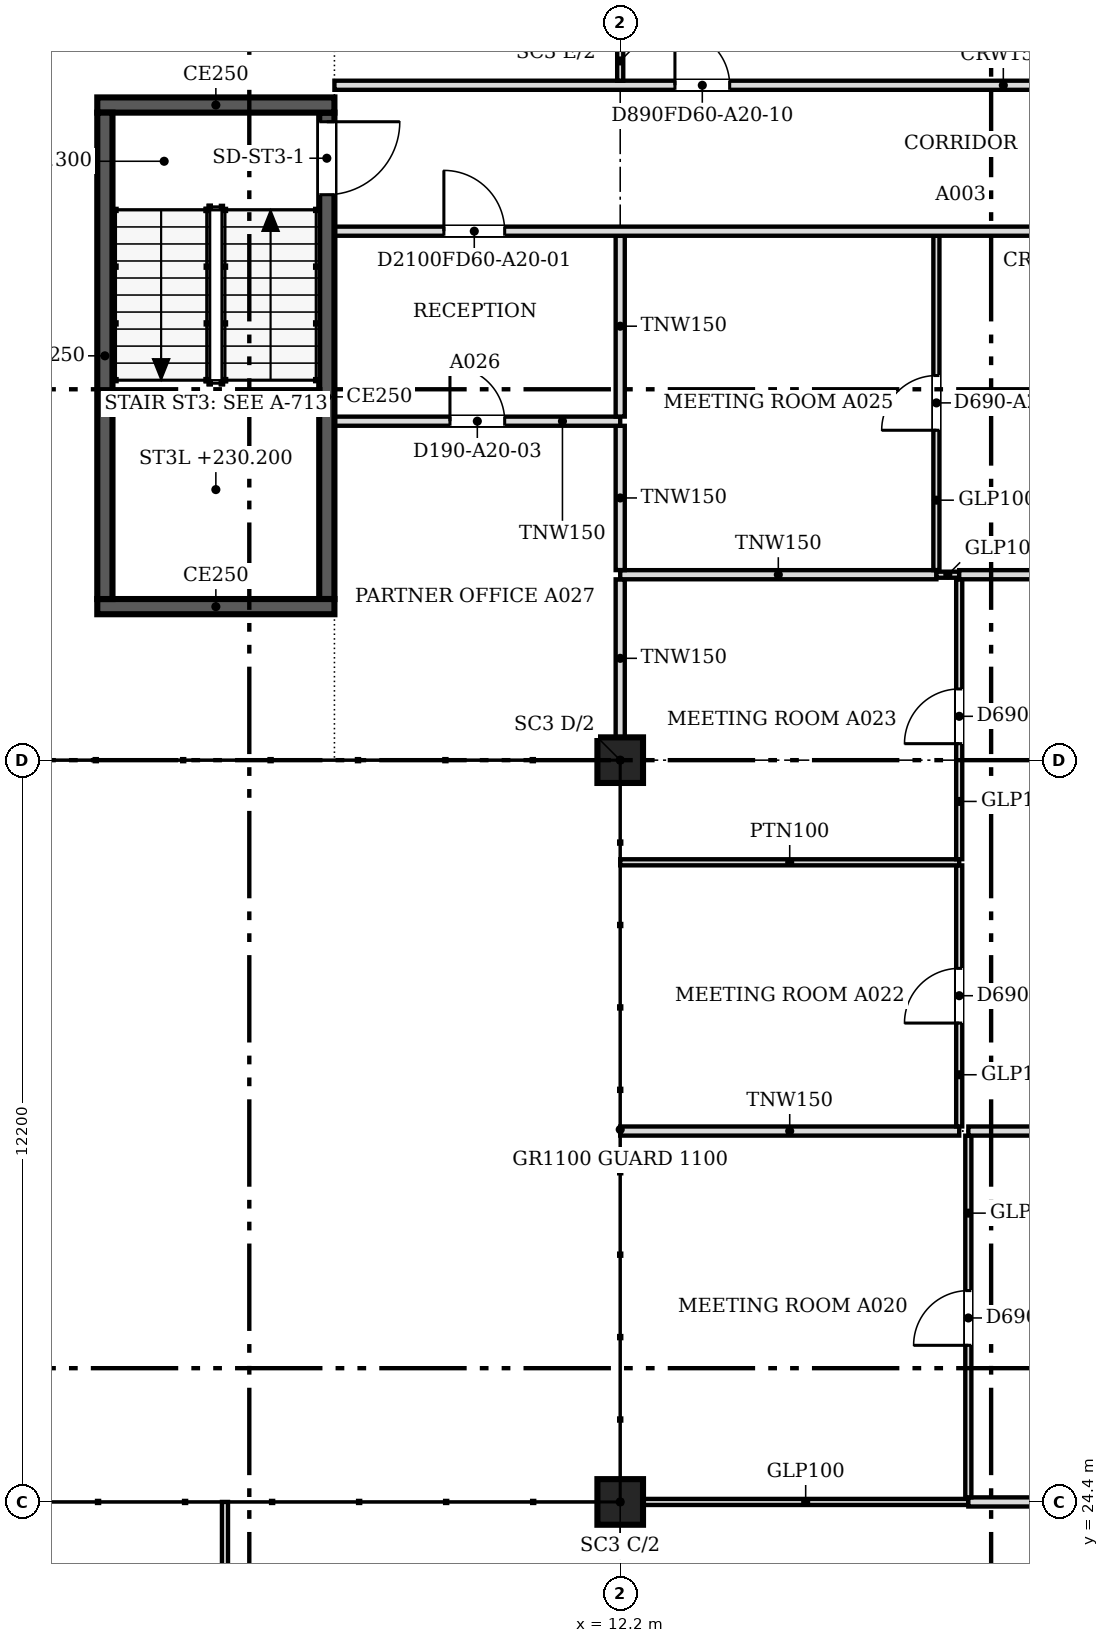
"""IFC4 building model, lengths in metres.
Left out: names, types, materials, properties, quantities, classifications, styles, units other than length and angle.
Written with IfcOpenShell. Run it as: python <this file> out.ifc"""

import sys

from ifc_helpers import new_model, si_unit, direction, frame, frame_2d, origin, origin_2d, place, context, subcontext, project, spatial, rectangle, extrude, source, transform, mapped, element, fill, save


model = new_model("IFC4")
c1 = context("Model", 3, precision=1e-05, world=origin(), true_north=direction((0.0, 1.0)))
c2 = subcontext(c1, "Body", "Model", "MODEL_VIEW")
j1 = project(units=[si_unit("LENGTHUNIT", "METRE"), si_unit("PLANEANGLEUNIT", "RADIAN")], contexts=[c1])
p1 = place(None, origin())
s1 = spatial("IfcSite", under=j1, at=p1, CompositionType="ELEMENT")
p2 = place(p1, origin())
s2 = spatial("IfcBuilding", under=s1, at=p2, CompositionType="ELEMENT")
p3 = place(p2, frame((0.0, 0.0, 228.3)))
s3 = spatial("IfcBuildingStorey", under=s2, at=p3, CompositionType="ELEMENT", Elevation=228.3)
for number, where, z_axis, x_axis in (
    (1, (12.2, 24.4, 0.0), (0.0, 0.0, 1.0), (1.0, 0.0, 0.0)),
    (2, (12.2, 36.6, 0.0), (0.0, 0.0, 1.0), (1.0, 0.0, 0.0)),
):
    element("IfcColumn", number, at=place(p3, frame(where, z_axis=z_axis, x_axis=x_axis)), inside=s3, PredefinedType="COLUMN", context=c2, shape_type="SweptSolid", body=[
        extrude(rectangle(XDim=0.75, YDim=0.75, at=origin_2d()), origin(), (0.0, 0.0, 1.0), 3.5),
    ])
p4 = place(p3, frame((7.5, 39.125, 0.0), z_axis=(0.0, 0.0, 1.0), x_axis=(-1.0, 0.0, 0.0)))
e3 = element("IfcWall", 3, at=p4, inside=s3, PredefinedType="SOLIDWALL", context=c2, shape_type="SweptSolid", body=[
    extrude(rectangle(XDim=3.9, YDim=0.25, at=frame_2d((1.95, 0.0))), origin(), (0.0, 0.0, 1.0), 3.8),
])
p5 = place(p3, frame((3.725, 39.25, 0.0), z_axis=(0.0, 0.0, 1.0), x_axis=(0.0, 1.0, 0.0)))
e4 = element("IfcWall", 4, at=p5, inside=s3, PredefinedType="SOLIDWALL", context=c2, shape_type="SweptSolid", body=[
    extrude(rectangle(XDim=8.0, YDim=0.25, at=frame_2d((4.0, 0.0))), origin(), (0.0, 0.0, 1.0), 3.8),
])
p6 = place(p3, frame((3.6, 47.375, 0.0), z_axis=(0.0, 0.0, 1.0), x_axis=(1.0, 0.0, 0.0)))
e5 = element("IfcWall", 5, at=p6, inside=s3, PredefinedType="SOLIDWALL", context=c2, shape_type="SweptSolid", body=[
    extrude(rectangle(XDim=3.9, YDim=0.25, at=frame_2d((1.95, 0.0))), origin(), (0.0, 0.0, 1.0), 3.8),
])
p7 = place(p3, frame((7.375, 47.25, 0.0), z_axis=(0.0, 0.0, 1.0), x_axis=(0.0, -1.0, 0.0)))
e6 = element("IfcWall", 6, at=p7, inside=s3, PredefinedType="SOLIDWALL", context=c2, shape_type="SweptSolid", body=[
    extrude(rectangle(XDim=8.0, YDim=0.25, at=frame_2d((4.0, 0.0))), origin(), (0.0, 0.0, 1.0), 3.8),
])
m1 = source(origin(), c2, "Body", "SweptSolid", [
    extrude(rectangle(XDim=1.2, YDim=2.1, at=frame_2d((0.6, 1.05))), frame((0.0, 0.135, 0.0), z_axis=(0.0, -1.0, 0.0), x_axis=(1.0, 0.0, 0.0)), (0.0, 0.0, 1.0), 0.27),
])
p8 = place(p7, frame((0.15, 0.0, 0.0)))
e7 = element("IfcOpeningElement", 7, at=p8, cuts=e6, PredefinedType="OPENING", context=c2, shape_type="MappedRepresentation", body=[
    mapped(m1, transform((0.0, 0.0, 0.0), scale=1.0)),
])
p9 = place(p3, frame((5.7, 18.99, 0.0), z_axis=(0.0, 0.0, 1.0), x_axis=(0.0, 1.0, 0.0)))
e8 = element("IfcWall", 8, at=p9, inside=s3, PredefinedType="PARTITIONING", context=c2, shape_type="SweptSolid", body=[
    extrude(rectangle(XDim=5.41, YDim=0.1, at=frame_2d((2.705, 0.0))), origin(), (0.0, 0.0, 1.0), 2.888),
])
m2 = source(origin(), c2, "Body", "SweptSolid", [
    extrude(rectangle(XDim=0.9, YDim=2.1, at=frame_2d((0.45, 1.05))), frame((0.0, 0.06, 0.0), z_axis=(0.0, -1.0, 0.0), x_axis=(1.0, 0.0, 0.0)), (0.0, 0.0, 1.0), 0.12),
])
p10 = place(p9, frame((2.3, 0.0, 0.0)))
e9 = element("IfcOpeningElement", 9, at=p10, cuts=e8, PredefinedType="OPENING", context=c2, shape_type="MappedRepresentation", body=[
    mapped(m2, transform((0.0, 0.0, 0.0), scale=1.0)),
])
p11 = place(p3, frame((12.576, 24.4, 0.0), z_axis=(0.0, 0.0, 1.0), x_axis=(1.0, 0.0, 0.0)))
e10 = element("IfcWall", 10, at=p11, inside=s3, PredefinedType="PARTITIONING", context=c2, shape_type="SweptSolid", body=[
    extrude(rectangle(XDim=5.348, YDim=0.1, at=frame_2d((2.674, 0.0))), origin(), (0.0, 0.0, 1.0), 2.888),
])
p12 = place(p3, frame((17.925, 24.4, 0.0), z_axis=(0.0, 0.0, 1.0), x_axis=(1.0, 0.0, 0.0)))
e11 = element("IfcWall", 11, at=p12, inside=s3, PredefinedType="PARTITIONING", context=c2, shape_type="SweptSolid", body=[
    extrude(rectangle(XDim=6.099, YDim=0.15, at=frame_2d((3.049, 0.0))), origin(), (0.0, 0.0, 1.0), 2.888),
])
p13 = place(p3, frame((17.925, 24.476, 0.0), z_axis=(0.0, 0.0, 1.0), x_axis=(0.0, 1.0, 0.0)))
e12 = element("IfcWall", 12, at=p13, inside=s3, PredefinedType="PARTITIONING", context=c2, shape_type="SweptSolid", body=[
    extrude(rectangle(XDim=5.948, YDim=0.1, at=frame_2d((2.974, 0.0))), origin(), (0.0, 0.0, 1.0), 2.888),
])
p14 = place(p13, frame((2.5, 0.0, 0.0)))
e13 = element("IfcOpeningElement", 13, at=p14, cuts=e12, PredefinedType="OPENING", context=c2, shape_type="MappedRepresentation", body=[
    mapped(m2, transform((0.0, 0.0, 0.0), scale=1.0)),
])
p15 = place(p3, frame((12.2, 30.5, 0.0), z_axis=(0.0, 0.0, 1.0), x_axis=(1.0, 0.0, 0.0)))
e14 = element("IfcWall", 14, at=p15, inside=s3, PredefinedType="PARTITIONING", context=c2, shape_type="SweptSolid", body=[
    extrude(rectangle(XDim=5.575, YDim=0.15, at=frame_2d((2.788, 0.0))), origin(), (0.0, 0.0, 1.0), 2.888),
])
p16 = place(p3, frame((17.925, 30.5, 0.0), z_axis=(0.0, 0.0, 1.0), x_axis=(1.0, 0.0, 0.0)))
e15 = element("IfcWall", 15, at=p16, inside=s3, PredefinedType="PARTITIONING", context=c2, shape_type="SweptSolid", body=[
    extrude(rectangle(XDim=10.099, YDim=0.15, at=frame_2d((5.049, 0.0))), origin(), (0.0, 0.0, 1.0), 2.888),
])
p17 = place(p3, frame((17.775, 30.576, 0.0), z_axis=(0.0, 0.0, 1.0), x_axis=(0.0, 1.0, 0.0)))
e16 = element("IfcWall", 16, at=p17, inside=s3, PredefinedType="PARTITIONING", context=c2, shape_type="SweptSolid", body=[
    extrude(rectangle(XDim=4.293, YDim=0.1, at=frame_2d((2.147, 0.0))), origin(), (0.0, 0.0, 1.0), 2.888),
])
p18 = place(p17, frame((1.7, 0.0, 0.0)))
e17 = element("IfcOpeningElement", 17, at=p18, cuts=e16, PredefinedType="OPENING", context=c2, shape_type="MappedRepresentation", body=[
    mapped(m2, transform((0.0, 0.0, 0.0), scale=1.0)),
])
p19 = place(p3, frame((12.2, 34.92, 0.0), z_axis=(0.0, 0.0, 1.0), x_axis=(1.0, 0.0, 0.0)))
e18 = element("IfcWall", 18, at=p19, inside=s3, PredefinedType="PARTITIONING", context=c2, shape_type="SweptSolid", body=[
    extrude(rectangle(XDim=5.575, YDim=0.1, at=frame_2d((2.788, 0.0))), origin(), (0.0, 0.0, 1.0), 2.888),
])
p20 = place(p3, frame((17.775, 34.971, 0.0), z_axis=(0.0, 0.0, 1.0), x_axis=(0.0, 1.0, 0.0)))
e19 = element("IfcWall", 19, at=p20, inside=s3, PredefinedType="PARTITIONING", context=c2, shape_type="SweptSolid", body=[
    extrude(rectangle(XDim=4.603, YDim=0.1, at=frame_2d((2.301, 0.0))), origin(), (0.0, 0.0, 1.0), 2.888),
])
p21 = place(p20, frame((1.9, 0.0, 0.0)))
e20 = element("IfcOpeningElement", 20, at=p21, cuts=e19, PredefinedType="OPENING", context=c2, shape_type="MappedRepresentation", body=[
    mapped(m2, transform((0.0, 0.0, 0.0), scale=1.0)),
])
p22 = place(p3, frame((12.2, 36.976, 0.0), z_axis=(0.0, 0.0, 1.0), x_axis=(0.0, 1.0, 0.0)))
e21 = element("IfcWall", 21, at=p22, inside=s3, PredefinedType="PARTITIONING", context=c2, shape_type="SweptSolid", body=[
    extrude(rectangle(XDim=2.598, YDim=0.15, at=frame_2d((1.299, 0.0))), origin(), (0.0, 0.0, 1.0), 2.888),
])
p23 = place(p3, frame((12.2, 39.65, 0.0), z_axis=(0.0, 0.0, 1.0), x_axis=(1.0, 0.0, 0.0)))
e22 = element("IfcWall", 22, at=p23, inside=s3, PredefinedType="PARTITIONING", context=c2, shape_type="SweptSolid", body=[
    extrude(rectangle(XDim=5.2, YDim=0.15, at=frame_2d((2.6, 0.0))), origin(), (0.0, 0.0, 1.0), 2.888),
])
p24 = place(p3, frame((17.401, 39.65, 0.0), z_axis=(0.0, 0.0, 1.0), x_axis=(1.0, 0.0, 0.0)))
e23 = element("IfcWall", 23, at=p24, inside=s3, PredefinedType="PARTITIONING", context=c2, shape_type="SweptSolid", body=[
    extrude(rectangle(XDim=0.373, YDim=0.1, at=frame_2d((0.187, 0.0))), origin(), (0.0, 0.0, 1.0), 2.888),
])
p25 = place(p3, frame((17.775, 39.65, 0.0), z_axis=(0.0, 0.0, 1.0), x_axis=(1.0, 0.0, 0.0)))
e24 = element("IfcWall", 24, at=p25, inside=s3, PredefinedType="PARTITIONING", context=c2, shape_type="SweptSolid", body=[
    extrude(rectangle(XDim=10.249, YDim=0.15, at=frame_2d((5.125, 0.0))), origin(), (0.0, 0.0, 1.0), 2.888),
])
p26 = place(p3, frame((12.2, 39.726, 0.0), z_axis=(0.0, 0.0, 1.0), x_axis=(0.0, 1.0, 0.0)))
e25 = element("IfcWall", 25, at=p26, inside=s3, PredefinedType="PARTITIONING", context=c2, shape_type="SweptSolid", body=[
    extrude(rectangle(XDim=2.373, YDim=0.15, at=frame_2d((1.187, 0.0))), origin(), (0.0, 0.0, 1.0), 2.888),
])
p27 = place(p3, frame((17.4, 39.726, 0.0), z_axis=(0.0, 0.0, 1.0), x_axis=(0.0, 1.0, 0.0)))
e26 = element("IfcWall", 26, at=p27, inside=s3, PredefinedType="PARTITIONING", context=c2, shape_type="SweptSolid", body=[
    extrude(rectangle(XDim=5.498, YDim=0.1, at=frame_2d((2.749, 0.0))), origin(), (0.0, 0.0, 1.0), 2.888),
])
p28 = place(p27, frame((2.3, 0.0, 0.0)))
e27 = element("IfcOpeningElement", 27, at=p28, cuts=e26, PredefinedType="OPENING", context=c2, shape_type="MappedRepresentation", body=[
    mapped(m2, transform((0.0, 0.0, 0.0), scale=1.0)),
])
p29 = place(p3, frame((12.2, 42.175, 0.0), z_axis=(0.0, 0.0, 1.0), x_axis=(-1.0, 0.0, 0.0)))
e28 = element("IfcWall", 28, at=p29, inside=s3, PredefinedType="PARTITIONING", context=c2, shape_type="SweptSolid", body=[
    extrude(rectangle(XDim=4.7, YDim=0.15, at=frame_2d((2.35, 0.0))), origin(), (0.0, 0.0, 1.0), 2.888),
])
m3 = source(origin(), c2, "Body", "SweptSolid", [
    extrude(rectangle(XDim=0.9, YDim=2.1, at=frame_2d((0.45, 1.05))), frame((0.0, 0.085, 0.0), z_axis=(0.0, -1.0, 0.0), x_axis=(1.0, 0.0, 0.0)), (0.0, 0.0, 1.0), 0.17),
])
p30 = place(p29, frame((1.9, 0.0, 0.0)))
e29 = element("IfcOpeningElement", 29, at=p30, cuts=e28, PredefinedType="OPENING", context=c2, shape_type="MappedRepresentation", body=[
    mapped(m3, transform((0.0, 0.0, 0.0), scale=1.0)),
])
p31 = place(p3, frame((12.2, 42.251, 0.0), z_axis=(0.0, 0.0, 1.0), x_axis=(0.0, 1.0, 0.0)))
e30 = element("IfcWall", 30, at=p31, inside=s3, PredefinedType="PARTITIONING", context=c2, shape_type="SweptSolid", body=[
    extrude(rectangle(XDim=2.973, YDim=0.15, at=frame_2d((1.487, 0.0))), origin(), (0.0, 0.0, 1.0), 2.888),
])
p32 = place(p3, frame((28.1, 45.3, 0.0), z_axis=(0.0, 0.0, 1.0), x_axis=(-1.0, 0.0, 0.0)))
e31 = element("IfcWall", 31, at=p32, inside=s3, PredefinedType="PARTITIONING", context=c2, shape_type="SweptSolid", body=[
    extrude(rectangle(XDim=20.6, YDim=0.15, at=frame_2d((10.3, 0.0))), origin(), (0.0, 0.0, 1.0), 2.888),
])
m4 = source(origin(), c2, "Body", "SweptSolid", [
    extrude(rectangle(XDim=1.0, YDim=2.1, at=frame_2d((0.5, 1.05))), frame((0.0, 0.085, 0.0), z_axis=(0.0, -1.0, 0.0), x_axis=(1.0, 0.0, 0.0)), (0.0, 0.0, 1.0), 0.17),
])
p33 = place(p32, frame((17.8, 0.0, 0.0)))
e32 = element("IfcOpeningElement", 32, at=p33, cuts=e31, PredefinedType="OPENING", context=c2, shape_type="MappedRepresentation", body=[
    mapped(m4, transform((0.0, 0.0, 0.0), scale=1.0)),
])
p34 = place(p3, frame((7.5, 47.7, 0.0), z_axis=(0.0, 0.0, 1.0), x_axis=(1.0, 0.0, 0.0)))
e33 = element("IfcWall", 33, at=p34, inside=s3, PredefinedType="PARTITIONING", context=c2, shape_type="SweptSolid", body=[
    extrude(rectangle(XDim=20.6, YDim=0.15, at=frame_2d((10.3, 0.0))), origin(), (0.0, 0.0, 1.0), 2.888),
])
p35 = place(p34, frame((15.501, 0.0, 0.0)))
e34 = element("IfcOpeningElement", 34, at=p35, cuts=e33, PredefinedType="OPENING", context=c2, shape_type="MappedRepresentation", body=[
    mapped(m4, transform((0.0, 0.0, 0.0), scale=1.0)),
])
p36 = place(p34, frame((5.6, 0.0, 0.0)))
e35 = element("IfcOpeningElement", 35, at=p36, cuts=e33, PredefinedType="OPENING", context=c2, shape_type="MappedRepresentation", body=[
    mapped(m3, transform((0.0, 0.0, 0.0), scale=1.0)),
])
p37 = place(p3, frame((12.2, 48.425, 0.0), z_axis=(0.0, 0.0, 1.0), x_axis=(0.0, -1.0, 0.0)))
e36 = element("IfcWall", 36, at=p37, inside=s3, PredefinedType="PARTITIONING", context=c2, shape_type="SweptSolid", body=[
    extrude(rectangle(XDim=0.65, YDim=0.1, at=frame_2d((0.325, 0.0))), origin(), (0.0, 0.0, 1.0), 2.888),
])
m5 = source(origin(), c2, "Body", "SweptSolid", [
    extrude(rectangle(XDim=1.2, YDim=2.1, at=frame_2d((0.6, 1.05))), frame((0.0, 0.025, 0.0), z_axis=(0.0, -1.0, 0.0), x_axis=(1.0, 0.0, 0.0)), (0.0, 0.0, 1.0), 0.05),
])
p38 = place(p8, origin())
e37 = element("IfcDoor", 37, at=p38, inside=s3, OperationType="SINGLE_SWING_LEFT", PredefinedType="DOOR", context=c2, shape_type="MappedRepresentation", body=[
    mapped(m5, transform((0.0, 0.0, 0.0), scale=1.0)),
])
fill(e7, e37)
m6 = source(origin(), c2, "Body", "SweptSolid", [
    extrude(rectangle(XDim=0.9, YDim=2.1, at=frame_2d((0.45, 1.05))), frame((0.0, 0.025, 0.0), z_axis=(0.0, -1.0, 0.0), x_axis=(1.0, 0.0, 0.0)), (0.0, 0.0, 1.0), 0.05),
])
p39 = place(p18, origin())
e38 = element("IfcDoor", 38, at=p39, inside=s3, OperationType="SINGLE_SWING_LEFT", PredefinedType="DOOR", context=c2, shape_type="MappedRepresentation", body=[
    mapped(m6, transform((0.0, 0.0, 0.0), scale=1.0)),
])
fill(e17, e38)
p40 = place(p21, origin())
e39 = element("IfcDoor", 39, at=p40, inside=s3, OperationType="SINGLE_SWING_LEFT", PredefinedType="DOOR", context=c2, shape_type="MappedRepresentation", body=[
    mapped(m6, transform((0.0, 0.0, 0.0), scale=1.0)),
])
fill(e20, e39)
m7 = source(origin(), c2, "Body", "SweptSolid", [
    extrude(rectangle(XDim=1.0, YDim=2.1, at=frame_2d((0.5, 1.05))), frame((0.0, 0.025, 0.0), z_axis=(0.0, -1.0, 0.0), x_axis=(1.0, 0.0, 0.0)), (0.0, 0.0, 1.0), 0.05),
])
p41 = place(p33, origin())
e40 = element("IfcDoor", 40, at=p41, inside=s3, OperationType="SINGLE_SWING_RIGHT", PredefinedType="DOOR", context=c2, shape_type="MappedRepresentation", body=[
    mapped(m7, transform((0.0, 0.0, 0.0), scale=1.0)),
])
fill(e32, e40)
p42 = place(p30, origin())
e41 = element("IfcDoor", 41, at=p42, inside=s3, OperationType="SINGLE_SWING_RIGHT", PredefinedType="DOOR", context=c2, shape_type="MappedRepresentation", body=[
    mapped(m6, transform((0.0, 0.0, 0.0), scale=1.0)),
])
fill(e29, e41)
p43 = place(p28, origin())
e42 = element("IfcDoor", 42, at=p43, inside=s3, OperationType="SINGLE_SWING_LEFT", PredefinedType="DOOR", context=c2, shape_type="MappedRepresentation", body=[
    mapped(m6, transform((0.0, 0.0, 0.0), scale=1.0)),
])
fill(e27, e42)
p44 = place(p14, origin())
e43 = element("IfcDoor", 43, at=p44, inside=s3, OperationType="SINGLE_SWING_LEFT", PredefinedType="DOOR", context=c2, shape_type="MappedRepresentation", body=[
    mapped(m6, transform((0.0, 0.0, 0.0), scale=1.0)),
])
fill(e13, e43)
p45 = place(p36, origin())
e44 = element("IfcDoor", 44, at=p45, inside=s3, OperationType="SINGLE_SWING_LEFT", PredefinedType="DOOR", context=c2, shape_type="MappedRepresentation", body=[
    mapped(m6, transform((0.0, 0.0, 0.0), scale=1.0)),
])
fill(e35, e44)
save(model, sys.argv[1])
